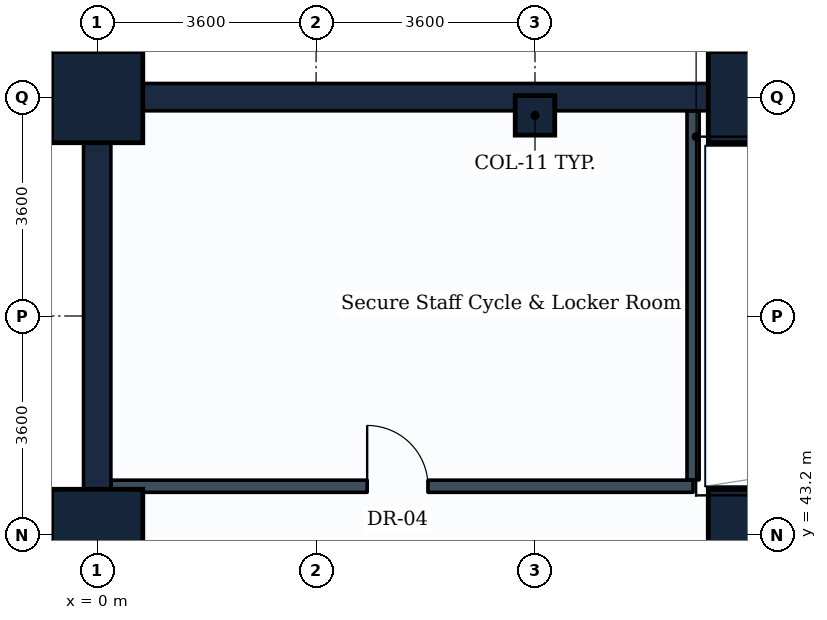
"""IFC4 building model, lengths in metres.
Left out: names, types, materials, properties, quantities, classifications, styles, units other than length and angle.
Written with IfcOpenShell. Run it as: python <this file> out.ifc"""

import sys

from ifc_helpers import new_model, si_unit, direction, frame, frame_2d, origin, origin_2d, place, context, subcontext, project, spatial, rectangle, extrude, element, fill, save


model = new_model("IFC4")
c1 = context("Model", 3, precision=1e-05, world=origin(), true_north=direction((0.0, 1.0)))
c2 = subcontext(c1, "Body", "Model", "MODEL_VIEW")
j1 = project(units=[si_unit("LENGTHUNIT", "METRE"), si_unit("PLANEANGLEUNIT", "RADIAN")], contexts=[c1])
p1 = place(None, origin())
s1 = spatial("IfcSite", under=j1, at=p1, CompositionType="ELEMENT")
p2 = place(p1, origin())
s2 = spatial("IfcBuilding", under=s1, at=p2, CompositionType="ELEMENT")
p3 = place(p2, frame((0.0, 0.0, -4.8)))
s3 = spatial("IfcBuildingStorey", under=s2, at=p3, CompositionType="ELEMENT", Elevation=-4.8)
for number, where, z_axis, x_axis in (
    (1, (0.0, 43.2, 0.0), (0.0, 0.0, 1.0), (1.0, 0.0, 0.0)),
    (2, (0.0, 50.4, 0.0), (0.0, 0.0, 1.0), (1.0, 0.0, 0.0)),
    (3, (10.8, 43.2, 0.0), (0.0, 0.0, 1.0), (1.0, 0.0, 0.0)),
    (4, (10.8, 50.4, 0.0), (0.0, 0.0, 1.0), (1.0, 0.0, 0.0)),
):
    element("IfcColumn", number, at=place(p3, frame(where, z_axis=z_axis, x_axis=x_axis)), inside=s3, PredefinedType="COLUMN", context=c2, shape_type="SweptSolid", body=[
        extrude(rectangle(XDim=1.5, YDim=1.5, at=origin_2d()), origin(), (0.0, 0.0, 1.0), 4.8),
    ])
p4 = place(p3, frame((7.2, 50.1, 0.0), z_axis=(0.0, 0.0, 1.0), x_axis=(1.0, 0.0, 0.0)))
e5 = element("IfcColumn", 5, at=p4, inside=s3, PredefinedType="PILASTER", context=c2, shape_type="SweptSolid", body=[
    extrude(rectangle(XDim=0.65, YDim=0.65, at=origin_2d()), origin(), (0.0, 0.0, 1.0), 4.8),
])
p5 = place(p3, frame((72.0, 50.4, 0.0), z_axis=(0.0, 0.0, 1.0), x_axis=(-1.0, 0.0, 0.0)))
e6 = element("IfcWall", 6, at=p5, inside=s3, PredefinedType="SOLIDWALL", context=c2, shape_type="SweptSolid", body=[
    extrude(rectangle(XDim=72.0, YDim=0.45, at=frame_2d((36.0, 0.0))), origin(), (0.0, 0.0, 1.0), 4.45),
])
p6 = place(p3, frame((0.0, 50.4, 0.0), z_axis=(0.0, 0.0, 1.0), x_axis=(0.0, -1.0, 0.0)))
e7 = element("IfcWall", 7, at=p6, inside=s3, PredefinedType="SOLIDWALL", context=c2, shape_type="SweptSolid", body=[
    extrude(rectangle(XDim=50.4, YDim=0.45, at=frame_2d((25.2, 0.0))), origin(), (0.0, 0.0, 1.0), 4.45),
])
p7 = place(p3, frame((0.229, 44.0, 0.0), z_axis=(0.0, 0.0, 1.0), x_axis=(1.0, 0.0, 0.0)))
e8 = element("IfcWall", 8, at=p7, inside=s3, PredefinedType="PARTITIONING", context=c2, shape_type="SweptSolid", body=[
    extrude(rectangle(XDim=9.571, YDim=0.2, at=frame_2d((4.786, 0.0))), origin(), (0.0, 0.0, 1.0), 3.93),
])
p8 = place(p7, frame((4.211, 0.0, 0.0)))
e9 = element("IfcOpeningElement", 9, at=p8, cuts=e8, PredefinedType="OPENING", context=c2, shape_type="SweptSolid", body=[
    extrude(rectangle(XDim=1.0, YDim=2.1, at=frame_2d((0.5, 1.05))), frame((0.0, 0.11, 0.0), z_axis=(0.0, -1.0, 0.0), x_axis=(1.0, 0.0, 0.0)), (0.0, 0.0, 1.0), 0.22),
])
p9 = place(p3, frame((9.8, 44.104, 0.0), z_axis=(0.0, 0.0, 1.0), x_axis=(0.0, 1.0, 0.0)))
e10 = element("IfcWall", 10, at=p9, inside=s3, PredefinedType="PARTITIONING", context=c2, shape_type="SweptSolid", body=[
    extrude(rectangle(XDim=6.067, YDim=0.2, at=frame_2d((3.033, 0.0))), origin(), (0.0, 0.0, 1.0), 4.435),
])
p10 = place(p8, origin())
e11 = element("IfcDoor", 11, at=p10, inside=s3, OperationType="SINGLE_SWING_LEFT", PredefinedType="DOOR", context=c2, shape_type="SweptSolid", body=[
    extrude(rectangle(XDim=1.0, YDim=2.1, at=frame_2d((0.5, 1.05))), frame((0.0, 0.025, 0.0), z_axis=(0.0, -1.0, 0.0), x_axis=(1.0, 0.0, 0.0)), (0.0, 0.0, 1.0), 0.05),
])
fill(e9, e11)
save(model, sys.argv[1])
